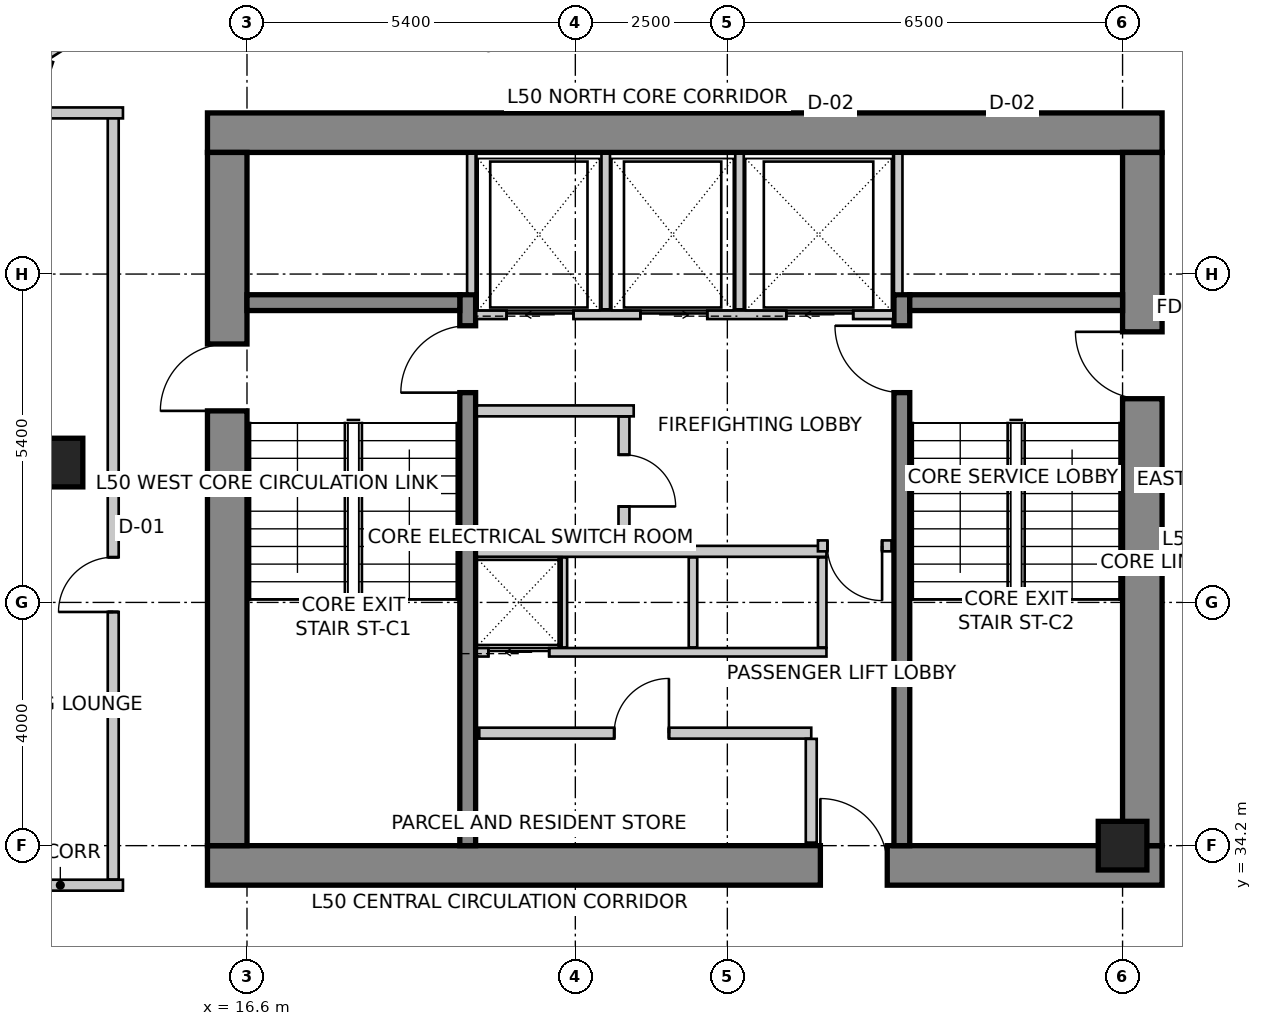
"""IFC4 building model, lengths in metres.
Left out: names, types, materials, properties, quantities, classifications, styles, units other than length and angle.
Written with IfcOpenShell. Run it as: python <this file> out.ifc"""

import sys

from ifc_helpers import new_model, si_unit, direction, frame, frame_2d, origin, origin_2d, place, context, subcontext, project, spatial, rectangle, extrude, source, transform, mapped, element, fill, save


model = new_model("IFC4")
c1 = context("Model", 3, precision=1e-05, world=origin(), true_north=direction((0.0, 1.0)))
c2 = subcontext(c1, "Body", "Model", "MODEL_VIEW")
j1 = project(units=[si_unit("LENGTHUNIT", "METRE"), si_unit("PLANEANGLEUNIT", "RADIAN")], contexts=[c1])
p1 = place(None, origin())
s1 = spatial("IfcSite", under=j1, at=p1, CompositionType="ELEMENT")
p2 = place(p1, origin())
s2 = spatial("IfcBuilding", under=s1, at=p2, CompositionType="ELEMENT")
p3 = place(p2, frame((0.0, 0.0, 200.9)))
s3 = spatial("IfcBuildingStorey", under=s2, at=p3, CompositionType="ELEMENT", Elevation=200.9)
p4 = place(p3, frame((15.95, 45.925, 0.0), z_axis=(0.0, 0.0, 1.0), x_axis=(1.0, 0.0, 0.0)))
e1 = element("IfcWall", 1, at=p4, inside=s3, PredefinedType="SHEAR", context=c2, shape_type="SweptSolid", body=[
    extrude(rectangle(XDim=15.7, YDim=0.65, at=frame_2d((7.85, 0.0))), origin(), (0.0, 0.0, 1.0), 3.5),
])
p5 = place(p3, frame((15.95, 33.875, 0.0), z_axis=(0.0, 0.0, 1.0), x_axis=(1.0, 0.0, 0.0)))
e2 = element("IfcWall", 2, at=p5, inside=s3, PredefinedType="SHEAR", context=c2, shape_type="SweptSolid", body=[
    extrude(rectangle(XDim=15.7, YDim=0.65, at=frame_2d((7.85, 0.0))), origin(), (0.0, 0.0, 1.0), 3.5),
])
m1 = source(origin(), c2, "Body", "SweptSolid", [
    extrude(rectangle(XDim=1.1, YDim=2.15, at=frame_2d((0.55, 1.075))), frame((0.0, 0.335, 0.0), z_axis=(0.0, -1.0, 0.0), x_axis=(1.0, 0.0, 0.0)), (0.0, 0.0, 1.0), 0.67),
])
p6 = place(p5, frame((10.08, 0.0, 0.0)))
e3 = element("IfcOpeningElement", 3, at=p6, cuts=e2, PredefinedType="OPENING", context=c2, shape_type="MappedRepresentation", body=[
    mapped(m1, transform((0.0, 0.0, 0.0), scale=1.0)),
])
p7 = place(p3, frame((16.275, 34.2, 0.0), z_axis=(0.0, 0.0, 1.0), x_axis=(0.0, 1.0, 0.0)))
e4 = element("IfcWall", 4, at=p7, inside=s3, PredefinedType="SHEAR", context=c2, shape_type="SweptSolid", body=[
    extrude(rectangle(XDim=11.4, YDim=0.65, at=frame_2d((5.7, 0.0))), origin(), (0.0, 0.0, 1.0), 3.5),
])
p8 = place(p7, frame((7.15, 0.0, 0.0)))
e5 = element("IfcOpeningElement", 5, at=p8, cuts=e4, PredefinedType="OPENING", context=c2, shape_type="MappedRepresentation", body=[
    mapped(m1, transform((0.0, 0.0, 0.0), scale=1.0)),
])
p9 = place(p3, frame((31.325, 34.2, 0.0), z_axis=(0.0, 0.0, 1.0), x_axis=(0.0, 1.0, 0.0)))
e6 = element("IfcWall", 6, at=p9, inside=s3, PredefinedType="SHEAR", context=c2, shape_type="SweptSolid", body=[
    extrude(rectangle(XDim=11.4, YDim=0.65, at=frame_2d((5.7, 0.0))), origin(), (0.0, 0.0, 1.0), 3.5),
])
p10 = place(p9, frame((7.35, 0.0, 0.0)))
e7 = element("IfcOpeningElement", 7, at=p10, cuts=e6, PredefinedType="OPENING", context=c2, shape_type="MappedRepresentation", body=[
    mapped(m1, transform((0.0, 0.0, 0.0), scale=1.0)),
])
p11 = place(p3, frame((20.23, 34.2, 0.0), z_axis=(0.0, 0.0, 1.0), x_axis=(0.0, 1.0, 0.0)))
e8 = element("IfcWall", 8, at=p11, inside=s3, PredefinedType="SHEAR", context=c2, shape_type="SweptSolid", body=[
    extrude(rectangle(XDim=9.06, YDim=0.26, at=frame_2d((4.53, 0.0))), origin(), (0.0, 0.0, 1.0), 3.5),
])
m2 = source(origin(), c2, "Body", "SweptSolid", [
    extrude(rectangle(XDim=1.1, YDim=2.15, at=frame_2d((0.55, 1.075))), frame((0.0, 0.14, 0.0), z_axis=(0.0, -1.0, 0.0), x_axis=(1.0, 0.0, 0.0)), (0.0, 0.0, 1.0), 0.28),
])
p12 = place(p11, frame((7.45, 0.0, 0.0)))
e9 = element("IfcOpeningElement", 9, at=p12, cuts=e8, PredefinedType="OPENING", context=c2, shape_type="MappedRepresentation", body=[
    mapped(m2, transform((0.0, 0.0, 0.0), scale=1.0)),
])
p13 = place(p3, frame((27.37, 34.2, 0.0), z_axis=(0.0, 0.0, 1.0), x_axis=(0.0, 1.0, 0.0)))
e10 = element("IfcWall", 10, at=p13, inside=s3, PredefinedType="SHEAR", context=c2, shape_type="SweptSolid", body=[
    extrude(rectangle(XDim=9.06, YDim=0.26, at=frame_2d((4.53, 0.0))), origin(), (0.0, 0.0, 1.0), 3.5),
])
p14 = place(p13, frame((7.45, 0.0, 0.0)))
e11 = element("IfcOpeningElement", 11, at=p14, cuts=e10, PredefinedType="OPENING", context=c2, shape_type="MappedRepresentation", body=[
    mapped(m2, transform((0.0, 0.0, 0.0), scale=1.0)),
])
for number, where, z_axis, x_axis in (
    (12, (16.6, 43.13, 0.0), (0.0, 0.0, 1.0), (1.0, 0.0, 0.0)),
    (13, (27.5, 43.13, 0.0), (0.0, 0.0, 1.0), (1.0, 0.0, 0.0)),
):
    element("IfcWall", number, at=place(p3, frame(where, z_axis=z_axis, x_axis=x_axis)), inside=s3, PredefinedType="SHEAR", context=c2, shape_type="SweptSolid", body=[
        extrude(rectangle(XDim=3.5, YDim=0.26, at=frame_2d((1.75, 0.0))), origin(), (0.0, 0.0, 1.0), 3.5),
    ])
m3 = source(origin(), c2, "Body", "SweptSolid", [
    extrude(rectangle(XDim=0.8, YDim=0.8, at=origin_2d()), origin(), (0.0, 0.0, 1.0), 3.5),
])
for number, where, z_axis, x_axis in (
    (14, (13.5, 40.5, 0.0), (0.0, 0.0, 1.0), (1.0, 0.0, 0.0)),
    (15, (31.0, 34.2, 0.0), (0.0, 0.0, 1.0), (1.0, 0.0, 0.0)),
):
    element("IfcColumn", number, at=place(p3, frame(where, z_axis=z_axis, x_axis=x_axis)), inside=s3, PredefinedType="COLUMN", context=c2, shape_type="MappedRepresentation", body=[
        mapped(m3, transform((0.0, 0.0, 0.0), scale=1.0)),
    ])
p15 = place(p3, frame((21.875, 52.742, 0.0), z_axis=(0.0, 0.0, 1.0), x_axis=(-0.843666375448, -0.536867811419, 0.0)))
e16 = element("IfcWall", 16, at=p15, inside=s3, PredefinedType="SOLIDWALL", context=c2, shape_type="SweptSolid", body=[
    extrude(rectangle(XDim=10.284, YDim=0.3, at=frame_2d((5.142, 0.0))), origin(), (0.0, 0.0, 1.0), 3.25),
])
m4 = source(origin(), c2, "Body", "SweptSolid", [
    extrude(rectangle(XDim=2.1, YDim=2.0, at=frame_2d((1.05, 1.0))), frame((0.0, 0.16, 0.0), z_axis=(0.0, -1.0, 0.0), x_axis=(1.0, 0.0, 0.0)), (0.0, 0.0, 1.0), 0.32),
])
p16 = place(p15, frame((3.457, 0.0, 0.85)))
e17 = element("IfcOpeningElement", 17, at=p16, cuts=e16, PredefinedType="OPENING", context=c2, shape_type="MappedRepresentation", body=[
    mapped(m4, transform((0.0, 0.0, 0.0), scale=1.0)),
])
p17 = place(p3, frame((13.269, 47.134, 0.0), z_axis=(0.0, 0.0, 1.0), x_axis=(-0.319920776449, -0.947444297464, 0.0)))
e18 = element("IfcWall", 18, at=p17, inside=s3, PredefinedType="SOLIDWALL", context=c2, shape_type="SweptSolid", body=[
    extrude(rectangle(XDim=16.133, YDim=0.3, at=frame_2d((8.067, 0.0))), origin(), (0.0, 0.0, 1.0), 3.25),
])
m5 = source(origin(), c2, "Body", "SweptSolid", [
    extrude(rectangle(XDim=2.4, YDim=2.2, at=frame_2d((1.2, 1.1))), frame((0.0, 0.16, 0.0), z_axis=(0.0, -1.0, 0.0), x_axis=(1.0, 0.0, 0.0)), (0.0, 0.0, 1.0), 0.32),
])
p18 = place(p17, frame((2.363, 0.0, 0.85)))
e19 = element("IfcOpeningElement", 19, at=p18, cuts=e18, PredefinedType="OPENING", context=c2, shape_type="MappedRepresentation", body=[
    mapped(m5, transform((0.0, 0.0, 0.0), scale=1.0)),
])
p19 = place(p17, frame((7.41, 0.0, 0.85)))
e20 = element("IfcOpeningElement", 20, at=p19, cuts=e18, PredefinedType="OPENING", context=c2, shape_type="MappedRepresentation", body=[
    mapped(m4, transform((0.0, 0.0, 0.0), scale=1.0)),
])
p20 = place(p17, frame((12.157, 0.0, 0.85)))
e21 = element("IfcOpeningElement", 21, at=p20, cuts=e18, PredefinedType="OPENING", context=c2, shape_type="MappedRepresentation", body=[
    mapped(m5, transform((0.0, 0.0, 0.0), scale=1.0)),
])
p21 = place(p3, frame((20.37, 42.93, 0.0), z_axis=(0.0, 0.0, 1.0), x_axis=(1.0, 0.0, 0.0)))
e22 = element("IfcWall", 22, at=p21, inside=s3, PredefinedType="SOLIDWALL", context=c2, shape_type="SweptSolid", body=[
    extrude(rectangle(XDim=6.86, YDim=0.14, at=frame_2d((3.43, 0.0))), origin(), (0.0, 0.0, 1.0), 3.25),
])
m6 = source(origin(), c2, "Body", "SweptSolid", [
    extrude(rectangle(XDim=1.1, YDim=2.15, at=frame_2d((0.55, 1.075))), frame((0.0, 0.08, 0.0), z_axis=(0.0, -1.0, 0.0), x_axis=(1.0, 0.0, 0.0)), (0.0, 0.0, 1.0), 0.16),
])
p22 = place(p21, frame((0.5, 0.0, 0.0)))
e23 = element("IfcOpeningElement", 23, at=p22, cuts=e22, PredefinedType="OPENING", context=c2, shape_type="MappedRepresentation", body=[
    mapped(m6, transform((0.0, 0.0, 0.0), scale=1.0)),
])
p23 = place(p21, frame((2.7, 0.0, 0.0)))
e24 = element("IfcOpeningElement", 24, at=p23, cuts=e22, PredefinedType="OPENING", context=c2, shape_type="MappedRepresentation", body=[
    mapped(m6, transform((0.0, 0.0, 0.0), scale=1.0)),
])
p24 = place(p21, frame((5.1, 0.0, 0.0)))
e25 = element("IfcOpeningElement", 25, at=p24, cuts=e22, PredefinedType="OPENING", context=c2, shape_type="MappedRepresentation", body=[
    mapped(m6, transform((0.0, 0.0, 0.0), scale=1.0)),
])
for number, where, z_axis, x_axis in (
    (26, (20.29, 43.28, 0.0), (0.0, 0.0, 1.0), (0.0, 1.0, 0.0)),
    (27, (27.31, 43.28, 0.0), (0.0, 0.0, 1.0), (0.0, 1.0, 0.0)),
):
    element("IfcWall", number, at=place(p3, frame(where, z_axis=z_axis, x_axis=x_axis)), inside=s3, PredefinedType="SOLIDWALL", context=c2, shape_type="SweptSolid", body=[
        extrude(rectangle(XDim=2.3, YDim=0.14, at=frame_2d((1.15, 0.0))), origin(), (0.0, 0.0, 1.0), 3.25),
    ])
for number, where, z_axis, x_axis in (
    (28, (22.5, 43.02, 0.0), (0.0, 0.0, 1.0), (0.0, 1.0, 0.0)),
    (29, (24.7, 43.02, 0.0), (0.0, 0.0, 1.0), (0.0, 1.0, 0.0)),
):
    element("IfcWall", number, at=place(p3, frame(where, z_axis=z_axis, x_axis=x_axis)), inside=s3, PredefinedType="SOLIDWALL", context=c2, shape_type="SweptSolid", body=[
        extrude(rectangle(XDim=2.56, YDim=0.14, at=frame_2d((1.28, 0.0))), origin(), (0.0, 0.0, 1.0), 3.25),
    ])
p25 = place(p3, frame((20.38, 37.38, 0.0), z_axis=(0.0, 0.0, 1.0), x_axis=(1.0, 0.0, 0.0)))
e30 = element("IfcWall", 30, at=p25, inside=s3, PredefinedType="SOLIDWALL", context=c2, shape_type="SweptSolid", body=[
    extrude(rectangle(XDim=5.75, YDim=0.14, at=frame_2d((2.875, 0.0))), origin(), (0.0, 0.0, 1.0), 3.25),
])
m7 = source(origin(), c2, "Body", "SweptSolid", [
    extrude(rectangle(XDim=1.0, YDim=2.15, at=frame_2d((0.5, 1.075))), frame((0.0, 0.08, 0.0), z_axis=(0.0, -1.0, 0.0), x_axis=(1.0, 0.0, 0.0)), (0.0, 0.0, 1.0), 0.16),
])
p26 = place(p25, frame((0.19, 0.0, 0.0)))
e31 = element("IfcOpeningElement", 31, at=p26, cuts=e30, PredefinedType="OPENING", context=c2, shape_type="MappedRepresentation", body=[
    mapped(m7, transform((0.0, 0.0, 0.0), scale=1.0)),
])
p27 = place(p3, frame((20.38, 39.04, 0.0), z_axis=(0.0, 0.0, 1.0), x_axis=(1.0, 0.0, 0.0)))
e32 = element("IfcWall", 32, at=p27, inside=s3, PredefinedType="SOLIDWALL", context=c2, shape_type="SweptSolid", body=[
    extrude(rectangle(XDim=5.75, YDim=0.18, at=frame_2d((2.875, 0.0))), origin(), (0.0, 0.0, 1.0), 3.25),
])
for number, where, z_axis, x_axis in (
    (33, (26.06, 37.46, 0.0), (0.0, 0.0, 1.0), (0.0, 1.0, 0.0)),
    (34, (21.795, 37.46, 0.0), (0.0, 0.0, 1.0), (0.0, 1.0, 0.0)),
    (35, (23.935, 37.46, 0.0), (0.0, 0.0, 1.0), (0.0, 1.0, 0.0)),
):
    element("IfcWall", number, at=place(p3, frame(where, z_axis=z_axis, x_axis=x_axis)), inside=s3, PredefinedType="SOLIDWALL", context=c2, shape_type="SweptSolid", body=[
        extrude(rectangle(XDim=1.48, YDim=0.14, at=frame_2d((0.74, 0.0))), origin(), (0.0, 0.0, 1.0), 3.25),
    ])
p28 = place(p3, frame((22.96, 41.35, 0.0), z_axis=(0.0, 0.0, 1.0), x_axis=(-1.0, 0.0, 0.0)))
e36 = element("IfcWall", 36, at=p28, inside=s3, PredefinedType="PARTITIONING", context=c2, shape_type="SweptSolid", body=[
    extrude(rectangle(XDim=2.58, YDim=0.18, at=frame_2d((1.29, 0.0))), origin(), (0.0, 0.0, 1.0), 3.25),
])
p29 = place(p3, frame((22.8, 41.256, 0.0), z_axis=(0.0, 0.0, 1.0), x_axis=(0.0, -1.0, 0.0)))
e37 = element("IfcWall", 37, at=p29, inside=s3, PredefinedType="PARTITIONING", context=c2, shape_type="SweptSolid", body=[
    extrude(rectangle(XDim=2.106, YDim=0.18, at=frame_2d((1.053, 0.0))), origin(), (0.0, 0.0, 1.0), 3.25),
])
m8 = source(origin(), c2, "Body", "SweptSolid", [
    extrude(rectangle(XDim=0.85, YDim=2.15, at=frame_2d((0.425, 1.075))), frame((0.0, 0.1, 0.0), z_axis=(0.0, -1.0, 0.0), x_axis=(1.0, 0.0, 0.0)), (0.0, 0.0, 1.0), 0.2),
])
p30 = place(p29, frame((0.628, 0.0, 0.0)))
e38 = element("IfcOpeningElement", 38, at=p30, cuts=e37, PredefinedType="OPENING", context=c2, shape_type="MappedRepresentation", body=[
    mapped(m8, transform((0.0, 0.0, 0.0), scale=1.0)),
])
p31 = place(p3, frame((27.2, 39.13, 0.0), z_axis=(0.0, 0.0, 1.0), x_axis=(-1.0, 0.0, 0.0)))
e39 = element("IfcWall", 39, at=p31, inside=s3, PredefinedType="PARTITIONING", context=c2, shape_type="SweptSolid", body=[
    extrude(rectangle(XDim=1.21, YDim=0.18, at=frame_2d((0.605, 0.0))), origin(), (0.0, 0.0, 1.0), 3.25),
])
m9 = source(origin(), c2, "Body", "SweptSolid", [
    extrude(rectangle(XDim=0.9, YDim=2.15, at=frame_2d((0.45, 1.075))), frame((0.0, 0.1, 0.0), z_axis=(0.0, -1.0, 0.0), x_axis=(1.0, 0.0, 0.0)), (0.0, 0.0, 1.0), 0.2),
])
p32 = place(p31, frame((0.155, 0.0, 0.0)))
e40 = element("IfcOpeningElement", 40, at=p32, cuts=e39, PredefinedType="OPENING", context=c2, shape_type="MappedRepresentation", body=[
    mapped(m9, transform((0.0, 0.0, 0.0), scale=1.0)),
])
p33 = place(p3, frame((20.42, 36.05, 0.0), z_axis=(0.0, 0.0, 1.0), x_axis=(1.0, 0.0, 0.0)))
e41 = element("IfcWall", 41, at=p33, inside=s3, PredefinedType="PARTITIONING", context=c2, shape_type="SweptSolid", body=[
    extrude(rectangle(XDim=5.46, YDim=0.18, at=frame_2d((2.73, 0.0))), origin(), (0.0, 0.0, 1.0), 3.25),
])
p34 = place(p33, frame((2.219, 0.0, 0.0)))
e42 = element("IfcOpeningElement", 42, at=p34, cuts=e41, PredefinedType="OPENING", context=c2, shape_type="MappedRepresentation", body=[
    mapped(m9, transform((0.0, 0.0, 0.0), scale=1.0)),
])
p35 = place(p3, frame((25.88, 35.956, 0.0), z_axis=(0.0, 0.0, 1.0), x_axis=(0.0, -1.0, 0.0)))
e43 = element("IfcWall", 43, at=p35, inside=s3, PredefinedType="PARTITIONING", context=c2, shape_type="SweptSolid", body=[
    extrude(rectangle(XDim=1.706, YDim=0.18, at=frame_2d((0.853, 0.0))), origin(), (0.0, 0.0, 1.0), 2.542),
])
p36 = place(p3, frame((12.5, 33.55, 0.0), z_axis=(0.0, 0.0, 1.0), x_axis=(1.0, 0.0, 0.0)))
e44 = element("IfcWall", 44, at=p36, inside=s3, PredefinedType="PARTITIONING", context=c2, shape_type="SweptSolid", body=[
    extrude(rectangle(XDim=2.06, YDim=0.18, at=frame_2d((1.03, 0.0))), origin(), (0.0, 0.0, 1.0), 3.25),
])
p37 = place(p3, frame((14.4, 33.644, 0.0), z_axis=(0.0, 0.0, 1.0), x_axis=(0.0, 1.0, 0.0)))
e45 = element("IfcWall", 45, at=p37, inside=s3, PredefinedType="PARTITIONING", context=c2, shape_type="SweptSolid", body=[
    extrude(rectangle(XDim=12.606, YDim=0.18, at=frame_2d((6.303, 0.0))), origin(), (0.0, 0.0, 1.0), 3.25),
])
p38 = place(p37, frame((4.399, 0.0, 0.0)))
e46 = element("IfcOpeningElement", 46, at=p38, cuts=e45, PredefinedType="OPENING", context=c2, shape_type="MappedRepresentation", body=[
    mapped(m9, transform((0.0, 0.0, 0.0), scale=1.0)),
])
p39 = place(p3, frame((14.56, 46.25, 0.0), z_axis=(0.0, 0.0, 1.0), x_axis=(-1.0, 0.0, 0.0)))
e47 = element("IfcWall", 47, at=p39, inside=s3, PredefinedType="PARTITIONING", context=c2, shape_type="SweptSolid", body=[
    extrude(rectangle(XDim=1.469, YDim=0.18, at=frame_2d((0.734, 0.0))), origin(), (0.0, 0.0, 1.0), 3.25),
])
m10 = source(origin(), c2, "Body", "SweptSolid", [
    extrude(rectangle(XDim=1.1, YDim=2.15, at=frame_2d((0.55, 1.075))), frame((0.0, 0.025, 0.0), z_axis=(0.0, -1.0, 0.0), x_axis=(1.0, 0.0, 0.0)), (0.0, 0.0, 1.0), 0.05),
])
p40 = place(p22, origin())
e48 = element("IfcDoor", 48, at=p40, inside=s3, OperationType="SLIDING_TO_LEFT", PredefinedType="DOOR", context=c2, shape_type="MappedRepresentation", body=[
    mapped(m10, transform((0.0, 0.0, 0.0), scale=1.0)),
])
fill(e23, e48)
p41 = place(p23, origin())
e49 = element("IfcDoor", 49, at=p41, inside=s3, OperationType="SLIDING_TO_RIGHT", PredefinedType="DOOR", context=c2, shape_type="MappedRepresentation", body=[
    mapped(m10, transform((0.0, 0.0, 0.0), scale=1.0)),
])
fill(e24, e49)
m11 = source(origin(), c2, "Body", "SweptSolid", [
    extrude(rectangle(XDim=1.1, YDim=2.15, at=frame_2d((0.55, 1.075))), frame((0.0, 0.025, 0.0), z_axis=(0.0, -1.0, 0.0), x_axis=(1.0, 0.0, 0.0)), (0.0, 0.0, 1.0), 0.05),
])
p42 = place(p24, origin())
e50 = element("IfcDoor", 50, at=p42, inside=s3, OperationType="SLIDING_TO_LEFT", PredefinedType="DOOR", context=c2, shape_type="MappedRepresentation", body=[
    mapped(m11, transform((0.0, 0.0, 0.0), scale=1.0)),
])
fill(e25, e50)
m12 = source(origin(), c2, "Body", "SweptSolid", [
    extrude(rectangle(XDim=1.0, YDim=2.15, at=frame_2d((0.5, 1.075))), frame((0.0, 0.025, 0.0), z_axis=(0.0, -1.0, 0.0), x_axis=(1.0, 0.0, 0.0)), (0.0, 0.0, 1.0), 0.05),
])
p43 = place(p26, origin())
e51 = element("IfcDoor", 51, at=p43, inside=s3, OperationType="SLIDING_TO_LEFT", PredefinedType="DOOR", context=c2, shape_type="MappedRepresentation", body=[
    mapped(m12, transform((0.0, 0.0, 0.0), scale=1.0)),
])
fill(e31, e51)
m13 = source(origin(), c2, "Body", "SweptSolid", [
    extrude(rectangle(XDim=1.1, YDim=2.15, at=frame_2d((0.55, 1.075))), frame((0.0, 0.025, 0.0), z_axis=(0.0, -1.0, 0.0), x_axis=(1.0, 0.0, 0.0)), (0.0, 0.0, 1.0), 0.05),
])
p44 = place(p12, origin())
e52 = element("IfcDoor", 52, at=p44, inside=s3, OperationType="SINGLE_SWING_LEFT", PredefinedType="DOOR", context=c2, shape_type="MappedRepresentation", body=[
    mapped(m13, transform((0.0, 0.0, 0.0), scale=1.0)),
])
fill(e9, e52)
p45 = place(p14, origin())
e53 = element("IfcDoor", 53, at=p45, inside=s3, OperationType="SINGLE_SWING_RIGHT", PredefinedType="DOOR", context=c2, shape_type="MappedRepresentation", body=[
    mapped(m13, transform((0.0, 0.0, 0.0), scale=1.0)),
])
fill(e11, e53)
p46 = place(p8, origin())
e54 = element("IfcDoor", 54, at=p46, inside=s3, OperationType="SINGLE_SWING_LEFT", PredefinedType="DOOR", context=c2, shape_type="MappedRepresentation", body=[
    mapped(m13, transform((0.0, 0.0, 0.0), scale=1.0)),
])
fill(e5, e54)
p47 = place(p10, origin())
e55 = element("IfcDoor", 55, at=p47, inside=s3, OperationType="SINGLE_SWING_RIGHT", PredefinedType="DOOR", context=c2, shape_type="MappedRepresentation", body=[
    mapped(m13, transform((0.0, 0.0, 0.0), scale=1.0)),
])
fill(e7, e55)
p48 = place(p6, origin())
e56 = element("IfcDoor", 56, at=p48, inside=s3, OperationType="SINGLE_SWING_LEFT", PredefinedType="DOOR", context=c2, shape_type="MappedRepresentation", body=[
    mapped(m13, transform((0.0, 0.0, 0.0), scale=1.0)),
])
fill(e3, e56)
m14 = source(origin(), c2, "Body", "SweptSolid", [
    extrude(rectangle(XDim=0.85, YDim=2.15, at=frame_2d((0.425, 1.075))), frame((0.0, 0.025, 0.0), z_axis=(0.0, -1.0, 0.0), x_axis=(1.0, 0.0, 0.0)), (0.0, 0.0, 1.0), 0.05),
])
p49 = place(p30, origin())
e57 = element("IfcDoor", 57, at=p49, inside=s3, OperationType="SINGLE_SWING_RIGHT", PredefinedType="DOOR", context=c2, shape_type="MappedRepresentation", body=[
    mapped(m14, transform((0.0, 0.0, 0.0), scale=1.0)),
])
fill(e38, e57)
m15 = source(origin(), c2, "Body", "SweptSolid", [
    extrude(rectangle(XDim=0.9, YDim=2.15, at=frame_2d((0.45, 1.075))), frame((0.0, 0.025, 0.0), z_axis=(0.0, -1.0, 0.0), x_axis=(1.0, 0.0, 0.0)), (0.0, 0.0, 1.0), 0.05),
])
p50 = place(p32, origin())
e58 = element("IfcDoor", 58, at=p50, inside=s3, OperationType="SINGLE_SWING_LEFT", PredefinedType="DOOR", context=c2, shape_type="MappedRepresentation", body=[
    mapped(m15, transform((0.0, 0.0, 0.0), scale=1.0)),
])
fill(e40, e58)
p51 = place(p34, origin())
e59 = element("IfcDoor", 59, at=p51, inside=s3, OperationType="SINGLE_SWING_RIGHT", PredefinedType="DOOR", context=c2, shape_type="MappedRepresentation", body=[
    mapped(m15, transform((0.0, 0.0, 0.0), scale=1.0)),
])
fill(e42, e59)
m16 = source(origin(), c2, "Body", "SweptSolid", [
    extrude(rectangle(XDim=0.9, YDim=2.15, at=frame_2d((0.45, 1.075))), frame((0.0, 0.025, 0.0), z_axis=(0.0, -1.0, 0.0), x_axis=(1.0, 0.0, 0.0)), (0.0, 0.0, 1.0), 0.05),
])
p52 = place(p38, origin())
e60 = element("IfcDoor", 60, at=p52, inside=s3, OperationType="SINGLE_SWING_LEFT", PredefinedType="DOOR", context=c2, shape_type="MappedRepresentation", body=[
    mapped(m16, transform((0.0, 0.0, 0.0), scale=1.0)),
])
fill(e46, e60)
save(model, sys.argv[1])
